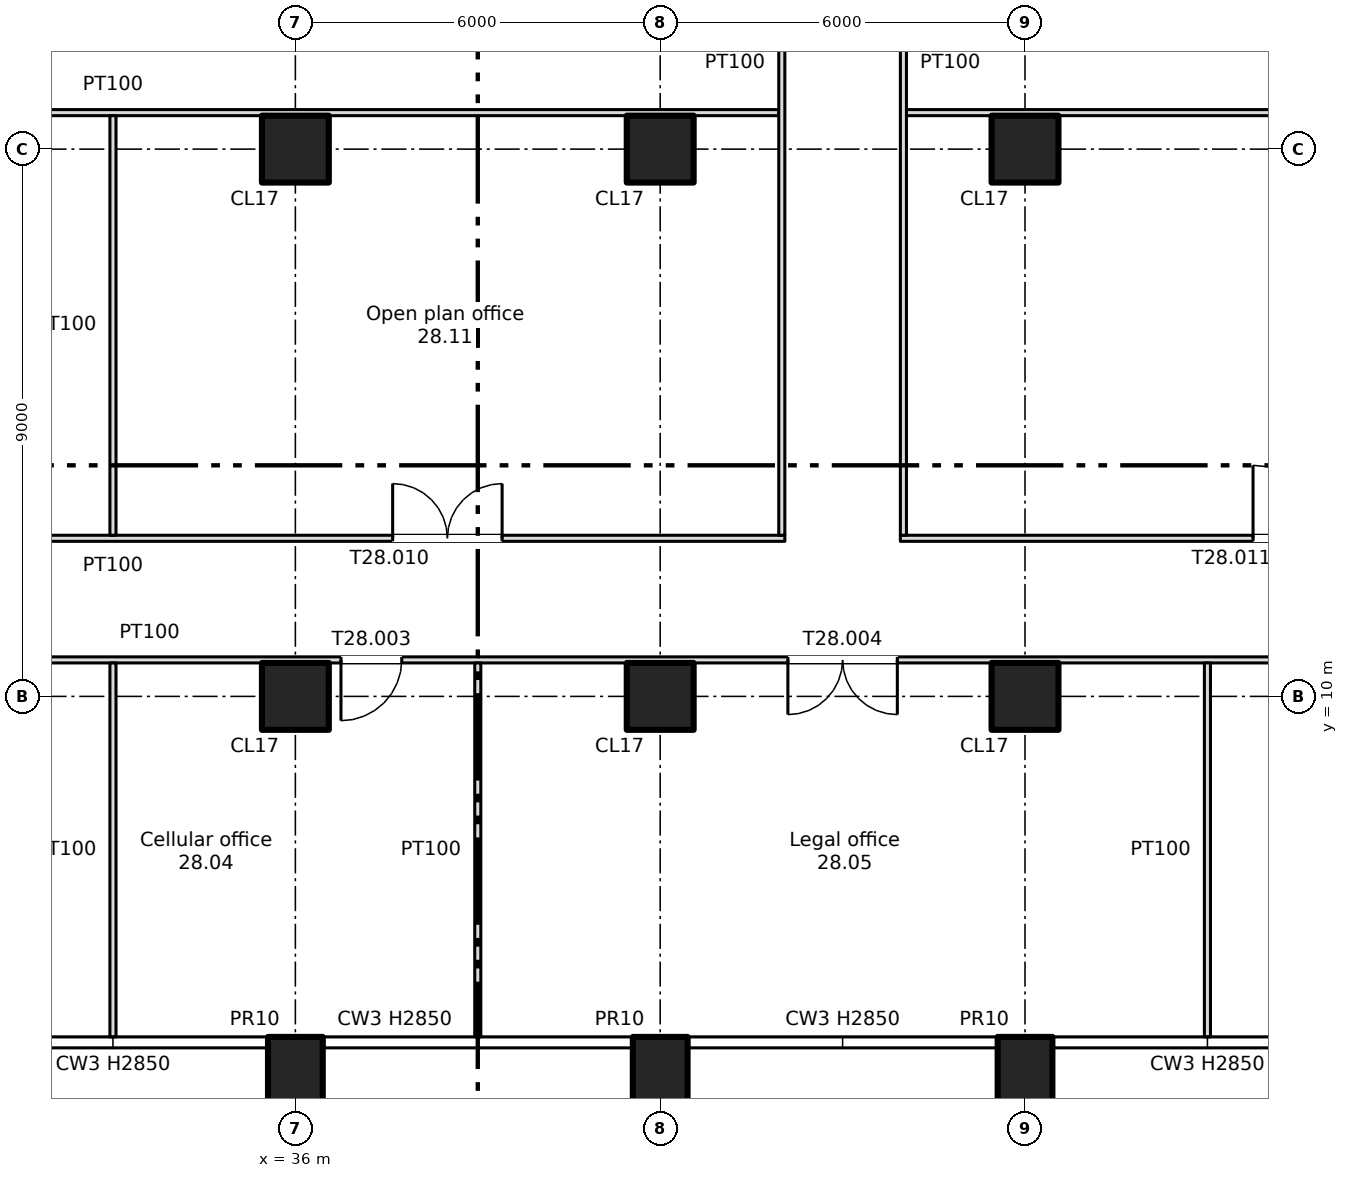
"""IFC4 building model, lengths in metres.
Left out: names, types, materials, properties, quantities, classifications, styles, units other than length and angle.
Written with IfcOpenShell. Run it as: python <this file> out.ifc"""

import sys

from ifc_helpers import new_model, si_unit, direction, frame, frame_2d, origin, origin_2d, place, context, subcontext, project, spatial, rectangle, extrude, element, fill, save


model = new_model("IFC4")
c1 = context("Model", 3, precision=1e-05, world=origin(), true_north=direction((0.0, 1.0)))
c2 = subcontext(c1, "Body", "Model", "MODEL_VIEW")
j1 = project(units=[si_unit("LENGTHUNIT", "METRE"), si_unit("PLANEANGLEUNIT", "RADIAN")], contexts=[c1])
p1 = place(None, origin())
s1 = spatial("IfcSite", under=j1, at=p1, CompositionType="ELEMENT")
p2 = place(p1, origin())
s2 = spatial("IfcBuilding", under=s1, at=p2, CompositionType="ELEMENT")
p3 = place(p2, frame((0.0, 0.0, 193.0)))
s3 = spatial("IfcBuildingStorey", under=s2, at=p3, CompositionType="ELEMENT", Elevation=193.0)
for number, where, z_axis, x_axis in (
    (1, (36.0, 3.7, -0.4), (0.0, 0.0, 1.0), (1.0, 0.0, 0.0)),
    (2, (42.0, 3.7, -0.4), (0.0, 0.0, 1.0), (1.0, 0.0, 0.0)),
    (3, (48.0, 3.7, -0.4), (0.0, 0.0, 1.0), (1.0, 0.0, 0.0)),
):
    element("IfcColumn", number, at=place(p3, frame(where, z_axis=z_axis, x_axis=x_axis)), inside=s3, PredefinedType="COLUMN", context=c2, shape_type="SweptSolid", body=[
        extrude(rectangle(XDim=0.9, YDim=1.4, at=origin_2d()), origin(), (0.0, 0.0, 1.0), 3.75),
    ])
for number, where, z_axis, x_axis in (
    (4, (36.0, 10.0, 0.0), (0.0, 0.0, 1.0), (1.0, 0.0, 0.0)),
    (5, (36.0, 19.0, 0.0), (0.0, 0.0, 1.0), (1.0, 0.0, 0.0)),
    (6, (42.0, 10.0, 0.0), (0.0, 0.0, 1.0), (1.0, 0.0, 0.0)),
    (7, (42.0, 19.0, 0.0), (0.0, 0.0, 1.0), (1.0, 0.0, 0.0)),
    (8, (48.0, 10.0, 0.0), (0.0, 0.0, 1.0), (1.0, 0.0, 0.0)),
    (9, (48.0, 19.0, 0.0), (0.0, 0.0, 1.0), (1.0, 0.0, 0.0)),
):
    element("IfcColumn", number, at=place(p3, frame(where, z_axis=z_axis, x_axis=x_axis)), inside=s3, PredefinedType="COLUMN", context=c2, shape_type="SweptSolid", body=[
        extrude(rectangle(XDim=1.1, YDim=1.1, at=origin_2d()), origin(), (0.0, 0.0, 1.0), 3.35),
    ])
p4 = place(p3, frame((6.6, 10.6, 0.0), z_axis=(0.0, 0.0, 1.0), x_axis=(1.0, 0.0, 0.0)))
e10 = element("IfcWall", 10, at=p4, inside=s3, PredefinedType="PARTITIONING", context=c2, shape_type="SweptSolid", body=[
    extrude(rectangle(XDim=64.8, YDim=0.1, at=frame_2d((32.4, 0.0))), origin(), (0.0, 0.0, 1.0), 3.35),
])
p5 = place(p4, frame((9.4, 0.0, 0.0)))
e11 = element("IfcOpeningElement", 11, at=p5, cuts=e10, PredefinedType="OPENING", context=c2, shape_type="SweptSolid", body=[
    extrude(rectangle(XDim=1.0, YDim=2.1, at=frame_2d((0.5, 1.05))), frame((0.0, 0.06, 0.0), z_axis=(0.0, -1.0, 0.0), x_axis=(1.0, 0.0, 0.0)), (0.0, 0.0, 1.0), 0.12),
])
p6 = place(p4, frame((19.5, 0.0, 0.0)))
e12 = element("IfcOpeningElement", 12, at=p6, cuts=e10, PredefinedType="OPENING", context=c2, shape_type="SweptSolid", body=[
    extrude(rectangle(XDim=1.8, YDim=2.1, at=frame_2d((0.9, 1.05))), frame((0.0, 0.06, 0.0), z_axis=(0.0, -1.0, 0.0), x_axis=(1.0, 0.0, 0.0)), (0.0, 0.0, 1.0), 0.12),
])
p7 = place(p4, frame((30.15, 0.0, 0.0)))
e13 = element("IfcOpeningElement", 13, at=p7, cuts=e10, PredefinedType="OPENING", context=c2, shape_type="SweptSolid", body=[
    extrude(rectangle(XDim=1.0, YDim=2.1, at=frame_2d((0.5, 1.05))), frame((0.0, 0.06, 0.0), z_axis=(0.0, -1.0, 0.0), x_axis=(1.0, 0.0, 0.0)), (0.0, 0.0, 1.0), 0.12),
])
p8 = place(p4, frame((37.5, 0.0, 0.0)))
e14 = element("IfcOpeningElement", 14, at=p8, cuts=e10, PredefinedType="OPENING", context=c2, shape_type="SweptSolid", body=[
    extrude(rectangle(XDim=1.8, YDim=2.1, at=frame_2d((0.9, 1.05))), frame((0.0, 0.06, 0.0), z_axis=(0.0, -1.0, 0.0), x_axis=(1.0, 0.0, 0.0)), (0.0, 0.0, 1.0), 0.12),
])
p9 = place(p4, frame((49.5, 0.0, 0.0)))
e15 = element("IfcOpeningElement", 15, at=p9, cuts=e10, PredefinedType="OPENING", context=c2, shape_type="SweptSolid", body=[
    extrude(rectangle(XDim=1.8, YDim=2.1, at=frame_2d((0.9, 1.05))), frame((0.0, 0.06, 0.0), z_axis=(0.0, -1.0, 0.0), x_axis=(1.0, 0.0, 0.0)), (0.0, 0.0, 1.0), 0.12),
])
p10 = place(p4, frame((60.1, 0.0, 0.0)))
e16 = element("IfcOpeningElement", 16, at=p10, cuts=e10, PredefinedType="OPENING", context=c2, shape_type="SweptSolid", body=[
    extrude(rectangle(XDim=1.0, YDim=2.1, at=frame_2d((0.5, 1.05))), frame((0.0, 0.06, 0.0), z_axis=(0.0, -1.0, 0.0), x_axis=(1.0, 0.0, 0.0)), (0.0, 0.0, 1.0), 0.12),
])
p11 = place(p4, frame((2.2, 0.0, 0.0)))
e17 = element("IfcOpeningElement", 17, at=p11, cuts=e10, PredefinedType="OPENING", context=c2, shape_type="SweptSolid", body=[
    extrude(rectangle(XDim=1.0, YDim=2.1, at=frame_2d((0.5, 1.05))), frame((0.0, 0.06, 0.0), z_axis=(0.0, -1.0, 0.0), x_axis=(1.0, 0.0, 0.0)), (0.0, 0.0, 1.0), 0.12),
])
p12 = place(p3, frame((21.95, 12.6, 0.0), z_axis=(0.0, 0.0, 1.0), x_axis=(1.0, 0.0, 0.0)))
e18 = element("IfcWall", 18, at=p12, inside=s3, PredefinedType="PARTITIONING", context=c2, shape_type="SweptSolid", body=[
    extrude(rectangle(XDim=22.1, YDim=0.1, at=frame_2d((11.05, 0.0))), origin(), (0.0, 0.0, 1.0), 3.35),
])
p13 = place(p12, frame((4.65, 0.0, 0.0)))
e19 = element("IfcOpeningElement", 19, at=p13, cuts=e18, PredefinedType="OPENING", context=c2, shape_type="SweptSolid", body=[
    extrude(rectangle(XDim=1.8, YDim=2.1, at=frame_2d((0.9, 1.05))), frame((0.0, 0.06, 0.0), z_axis=(0.0, -1.0, 0.0), x_axis=(1.0, 0.0, 0.0)), (0.0, 0.0, 1.0), 0.12),
])
p14 = place(p12, frame((15.65, 0.0, 0.0)))
e20 = element("IfcOpeningElement", 20, at=p14, cuts=e18, PredefinedType="OPENING", context=c2, shape_type="SweptSolid", body=[
    extrude(rectangle(XDim=1.8, YDim=2.1, at=frame_2d((0.9, 1.05))), frame((0.0, 0.06, 0.0), z_axis=(0.0, -1.0, 0.0), x_axis=(1.0, 0.0, 0.0)), (0.0, 0.0, 1.0), 0.12),
])
p15 = place(p3, frame((45.95, 12.6, 0.0), z_axis=(0.0, 0.0, 1.0), x_axis=(1.0, 0.0, 0.0)))
e21 = element("IfcWall", 21, at=p15, inside=s3, PredefinedType="PARTITIONING", context=c2, shape_type="SweptSolid", body=[
    extrude(rectangle(XDim=25.45, YDim=0.1, at=frame_2d((12.725, 0.0))), origin(), (0.0, 0.0, 1.0), 3.35),
])
p16 = place(p15, frame((5.8, 0.0, 0.0)))
e22 = element("IfcOpeningElement", 22, at=p16, cuts=e21, PredefinedType="OPENING", context=c2, shape_type="SweptSolid", body=[
    extrude(rectangle(XDim=1.2, YDim=2.1, at=frame_2d((0.6, 1.05))), frame((0.0, 0.06, 0.0), z_axis=(0.0, -1.0, 0.0), x_axis=(1.0, 0.0, 0.0)), (0.0, 0.0, 1.0), 0.12),
])
p17 = place(p15, frame((18.5, 0.0, 0.0)))
e23 = element("IfcOpeningElement", 23, at=p17, cuts=e21, PredefinedType="OPENING", context=c2, shape_type="SweptSolid", body=[
    extrude(rectangle(XDim=1.2, YDim=2.1, at=frame_2d((0.6, 1.05))), frame((0.0, 0.06, 0.0), z_axis=(0.0, -1.0, 0.0), x_axis=(1.0, 0.0, 0.0)), (0.0, 0.0, 1.0), 0.12),
])
p18 = place(p3, frame((22.05, 19.6, 0.0), z_axis=(0.0, 0.0, 1.0), x_axis=(1.0, 0.0, 0.0)))
e24 = element("IfcWall", 24, at=p18, inside=s3, PredefinedType="PARTITIONING", context=c2, shape_type="SweptSolid", body=[
    extrude(rectangle(XDim=21.9, YDim=0.1, at=frame_2d((10.95, 0.0))), origin(), (0.0, 0.0, 1.0), 3.35),
])
p19 = place(p3, frame((46.05, 19.6, 0.0), z_axis=(0.0, 0.0, 1.0), x_axis=(1.0, 0.0, 0.0)))
e25 = element("IfcWall", 25, at=p19, inside=s3, PredefinedType="PARTITIONING", context=c2, shape_type="SweptSolid", body=[
    extrude(rectangle(XDim=25.35, YDim=0.1, at=frame_2d((12.675, 0.0))), origin(), (0.0, 0.0, 1.0), 3.35),
])
p20 = place(p3, frame((33.0, 4.4, 0.0), z_axis=(0.0, 0.0, 1.0), x_axis=(0.0, 1.0, 0.0)))
e26 = element("IfcWall", 26, at=p20, inside=s3, PredefinedType="PARTITIONING", context=c2, shape_type="SweptSolid", body=[
    extrude(rectangle(XDim=6.15, YDim=0.1, at=frame_2d((3.075, 0.0))), origin(), (0.0, 0.0, 1.0), 3.35),
])
p21 = place(p3, frame((33.0, 12.65, 0.0), z_axis=(0.0, 0.0, 1.0), x_axis=(0.0, 1.0, 0.0)))
e27 = element("IfcWall", 27, at=p21, inside=s3, PredefinedType="PARTITIONING", context=c2, shape_type="SweptSolid", body=[
    extrude(rectangle(XDim=6.9, YDim=0.1, at=frame_2d((3.45, 0.0))), origin(), (0.0, 0.0, 1.0), 3.35),
])
p22 = place(p3, frame((39.0, 4.4, 0.0), z_axis=(0.0, 0.0, 1.0), x_axis=(0.0, 1.0, 0.0)))
e28 = element("IfcWall", 28, at=p22, inside=s3, PredefinedType="PARTITIONING", context=c2, shape_type="SweptSolid", body=[
    extrude(rectangle(XDim=6.15, YDim=0.1, at=frame_2d((3.075, 0.0))), origin(), (0.0, 0.0, 1.0), 3.35),
])
for number, where, z_axis, x_axis in (
    (29, (44.0, 12.65, 0.0), (0.0, 0.0, 1.0), (0.0, 1.0, 0.0)),
    (30, (46.0, 12.65, 0.0), (0.0, 0.0, 1.0), (0.0, 1.0, 0.0)),
):
    element("IfcWall", number, at=place(p3, frame(where, z_axis=z_axis, x_axis=x_axis)), inside=s3, PredefinedType="PARTITIONING", context=c2, shape_type="SweptSolid", body=[
        extrude(rectangle(XDim=13.3, YDim=0.1, at=frame_2d((6.65, 0.0))), origin(), (0.0, 0.0, 1.0), 3.35),
    ])
p23 = place(p3, frame((51.0, 4.4, 0.0), z_axis=(0.0, 0.0, 1.0), x_axis=(0.0, 1.0, 0.0)))
e31 = element("IfcWall", 31, at=p23, inside=s3, PredefinedType="PARTITIONING", context=c2, shape_type="SweptSolid", body=[
    extrude(rectangle(XDim=6.15, YDim=0.1, at=frame_2d((3.075, 0.0))), origin(), (0.0, 0.0, 1.0), 3.35),
])
p24 = place(p7, origin())
e32 = element("IfcDoor", 32, at=p24, inside=s3, OperationType="SINGLE_SWING_LEFT", PredefinedType="DOOR", context=c2, shape_type="SweptSolid", body=[
    extrude(rectangle(XDim=1.0, YDim=2.1, at=frame_2d((0.5, 1.05))), frame((0.0, 0.025, 0.0), z_axis=(0.0, -1.0, 0.0), x_axis=(1.0, 0.0, 0.0)), (0.0, 0.0, 1.0), 0.05),
])
fill(e13, e32)
p25 = place(p8, origin())
e33 = element("IfcDoor", 33, at=p25, inside=s3, OperationType="DOUBLE_DOOR_SINGLE_SWING", PredefinedType="DOOR", context=c2, shape_type="SweptSolid", body=[
    extrude(rectangle(XDim=1.8, YDim=2.1, at=frame_2d((0.9, 1.05))), frame((0.0, 0.025, 0.0), z_axis=(0.0, -1.0, 0.0), x_axis=(1.0, 0.0, 0.0)), (0.0, 0.0, 1.0), 0.05),
])
fill(e14, e33)
p26 = place(p14, origin())
e34 = element("IfcDoor", 34, at=p26, inside=s3, OperationType="DOUBLE_DOOR_SINGLE_SWING", PredefinedType="DOOR", context=c2, shape_type="SweptSolid", body=[
    extrude(rectangle(XDim=1.8, YDim=2.1, at=frame_2d((0.9, 1.05))), frame((0.0, 0.025, 0.0), z_axis=(0.0, -1.0, 0.0), x_axis=(1.0, 0.0, 0.0)), (0.0, 0.0, 1.0), 0.05),
])
fill(e20, e34)
p27 = place(p16, origin())
e35 = element("IfcDoor", 35, at=p27, inside=s3, OperationType="SINGLE_SWING_LEFT", PredefinedType="DOOR", context=c2, shape_type="SweptSolid", body=[
    extrude(rectangle(XDim=1.2, YDim=2.1, at=frame_2d((0.6, 1.05))), frame((0.0, 0.025, 0.0), z_axis=(0.0, -1.0, 0.0), x_axis=(1.0, 0.0, 0.0)), (0.0, 0.0, 1.0), 0.05),
])
fill(e22, e35)
save(model, sys.argv[1])
